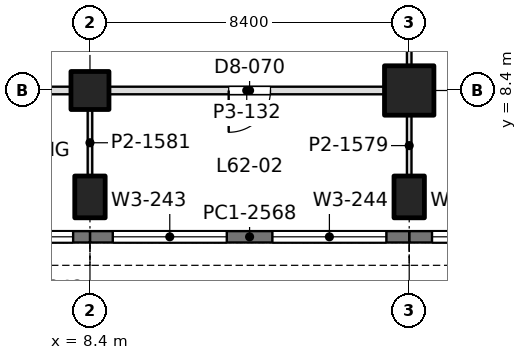
"""IFC4 building model, lengths in metres.
Left out: names, types, materials, properties, quantities, classifications, styles, units other than length and angle.
Written with IfcOpenShell. Run it as: python <this file> out.ifc"""

import sys

from ifc_helpers import new_model, si_unit, direction, frame, frame_2d, origin, origin_2d, place, context, subcontext, project, spatial, rectangle, extrude, element, fill, save


model = new_model("IFC4")
c1 = context("Model", 3, precision=1e-05, world=origin(), true_north=direction((0.0, 1.0)))
c2 = subcontext(c1, "Body", "Model", "MODEL_VIEW")
j1 = project(units=[si_unit("LENGTHUNIT", "METRE"), si_unit("PLANEANGLEUNIT", "RADIAN")], contexts=[c1])
p1 = place(None, origin())
s1 = spatial("IfcSite", under=j1, at=p1, CompositionType="ELEMENT")
p2 = place(p1, origin())
s2 = spatial("IfcBuilding", under=s1, at=p2, CompositionType="ELEMENT")
p3 = place(p2, frame((0.0, 0.0, 272.7)))
s3 = spatial("IfcBuildingStorey", under=s2, at=p3, CompositionType="ELEMENT", Elevation=272.7)
p4 = place(p3, frame((8.4, 5.6, 0.0), z_axis=(0.0, 0.0, 1.0), x_axis=(1.0, 0.0, 0.0)))
e1 = element("IfcColumn", 1, at=p4, inside=s3, PredefinedType="COLUMN", context=c2, shape_type="SweptSolid", body=[
    extrude(rectangle(XDim=0.8, YDim=1.1, at=origin_2d()), origin(), (0.0, 0.0, 1.0), 4.5),
])
p5 = place(p3, frame((8.4, 8.4, 0.0), z_axis=(0.0, 0.0, 1.0), x_axis=(1.0, 0.0, 0.0)))
e2 = element("IfcColumn", 2, at=p5, inside=s3, PredefinedType="COLUMN", context=c2, shape_type="SweptSolid", body=[
    extrude(rectangle(XDim=1.0, YDim=1.0, at=origin_2d()), origin(), (0.0, 0.0, 1.0), 4.5),
])
p6 = place(p3, frame((16.8, 5.6, 0.0), z_axis=(0.0, 0.0, 1.0), x_axis=(1.0, 0.0, 0.0)))
e3 = element("IfcColumn", 3, at=p6, inside=s3, PredefinedType="COLUMN", context=c2, shape_type="SweptSolid", body=[
    extrude(rectangle(XDim=0.8, YDim=1.1, at=origin_2d()), origin(), (0.0, 0.0, 1.0), 4.5),
])
p7 = place(p3, frame((16.8, 8.4, 0.0), z_axis=(0.0, 0.0, 1.0), x_axis=(1.0, 0.0, 0.0)))
e4 = element("IfcColumn", 4, at=p7, inside=s3, PredefinedType="COLUMN", context=c2, shape_type="SweptSolid", body=[
    extrude(rectangle(XDim=1.3, YDim=1.3, at=origin_2d()), origin(), (0.0, 0.0, 1.0), 4.5),
])
p8 = place(p3, frame((25.2, 4.55, 0.0), z_axis=(0.0, 0.0, 1.0), x_axis=(-1.0, 0.0, 0.0)))
e5 = element("IfcWall", 5, at=p8, inside=s3, PredefinedType="SOLIDWALL", context=c2, shape_type="SweptSolid", body=[
    extrude(rectangle(XDim=8.4, YDim=0.3, at=frame_2d((4.2, 0.0))), origin(), (0.0, 0.0, 1.0), 4.35),
])
p9 = place(p8, frame((0.6, 0.0, 0.9)))
e6 = element("IfcOpeningElement", 6, at=p9, cuts=e5, PredefinedType="OPENING", context=c2, shape_type="SweptSolid", body=[
    extrude(rectangle(XDim=3.0, YDim=2.4, at=frame_2d((1.5, 1.2))), frame((0.0, 0.16, 0.0), z_axis=(0.0, -1.0, 0.0), x_axis=(1.0, 0.0, 0.0)), (0.0, 0.0, 1.0), 0.32),
])
p10 = place(p8, frame((4.8, 0.0, 0.9)))
e7 = element("IfcOpeningElement", 7, at=p10, cuts=e5, PredefinedType="OPENING", context=c2, shape_type="SweptSolid", body=[
    extrude(rectangle(XDim=3.0, YDim=2.4, at=frame_2d((1.5, 1.2))), frame((0.0, 0.16, 0.0), z_axis=(0.0, -1.0, 0.0), x_axis=(1.0, 0.0, 0.0)), (0.0, 0.0, 1.0), 0.32),
])
p11 = place(p3, frame((16.8, 4.55, 0.0), z_axis=(0.0, 0.0, 1.0), x_axis=(-1.0, 0.0, 0.0)))
e8 = element("IfcWall", 8, at=p11, inside=s3, PredefinedType="SOLIDWALL", context=c2, shape_type="SweptSolid", body=[
    extrude(rectangle(XDim=8.4, YDim=0.3, at=frame_2d((4.2, 0.0))), origin(), (0.0, 0.0, 1.0), 4.35),
])
p12 = place(p11, frame((0.6, 0.0, 0.9)))
e9 = element("IfcOpeningElement", 9, at=p12, cuts=e8, PredefinedType="OPENING", context=c2, shape_type="SweptSolid", body=[
    extrude(rectangle(XDim=3.0, YDim=2.4, at=frame_2d((1.5, 1.2))), frame((0.0, 0.16, 0.0), z_axis=(0.0, -1.0, 0.0), x_axis=(1.0, 0.0, 0.0)), (0.0, 0.0, 1.0), 0.32),
])
p13 = place(p11, frame((4.8, 0.0, 0.9)))
e10 = element("IfcOpeningElement", 10, at=p13, cuts=e8, PredefinedType="OPENING", context=c2, shape_type="SweptSolid", body=[
    extrude(rectangle(XDim=3.0, YDim=2.4, at=frame_2d((1.5, 1.2))), frame((0.0, 0.16, 0.0), z_axis=(0.0, -1.0, 0.0), x_axis=(1.0, 0.0, 0.0)), (0.0, 0.0, 1.0), 0.32),
])
p14 = place(p3, frame((8.4, 4.55, 0.0), z_axis=(0.0, 0.0, 1.0), x_axis=(-1.0, 0.0, 0.0)))
e11 = element("IfcWall", 11, at=p14, inside=s3, PredefinedType="SOLIDWALL", context=c2, shape_type="SweptSolid", body=[
    extrude(rectangle(XDim=8.085, YDim=0.3, at=frame_2d((4.042, 0.0))), origin(), (0.0, 0.0, 1.0), 4.35),
])
p15 = place(p14, frame((0.443, 0.0, 0.9)))
e12 = element("IfcOpeningElement", 12, at=p15, cuts=e11, PredefinedType="OPENING", context=c2, shape_type="SweptSolid", body=[
    extrude(rectangle(XDim=3.0, YDim=2.4, at=frame_2d((1.5, 1.2))), frame((0.0, 0.16, 0.0), z_axis=(0.0, -1.0, 0.0), x_axis=(1.0, 0.0, 0.0)), (0.0, 0.0, 1.0), 0.32),
])
p16 = place(p14, frame((4.643, 0.0, 0.9)))
e13 = element("IfcOpeningElement", 13, at=p16, cuts=e11, PredefinedType="OPENING", context=c2, shape_type="SweptSolid", body=[
    extrude(rectangle(XDim=3.0, YDim=2.4, at=frame_2d((1.5, 1.2))), frame((0.0, 0.16, 0.0), z_axis=(0.0, -1.0, 0.0), x_axis=(1.0, 0.0, 0.0)), (0.0, 0.0, 1.0), 0.32),
])
p17 = place(p3, frame((0.549, 8.4, 0.0), z_axis=(0.0, 0.0, 1.0), x_axis=(1.0, 0.0, 0.0)))
e14 = element("IfcWall", 14, at=p17, inside=s3, PredefinedType="PARTITIONING", context=c2, shape_type="SweptSolid", body=[
    extrude(rectangle(XDim=7.352, YDim=0.2, at=frame_2d((3.676, 0.0))), origin(), (0.0, 0.0, 1.0), 3.8),
])
p18 = place(p17, frame((2.651, 0.0, 0.0)))
e15 = element("IfcOpeningElement", 15, at=p18, cuts=e14, PredefinedType="OPENING", context=c2, shape_type="SweptSolid", body=[
    extrude(rectangle(XDim=1.1, YDim=2.4, at=frame_2d((0.55, 1.2))), frame((0.0, 0.11, 0.0), z_axis=(0.0, -1.0, 0.0), x_axis=(1.0, 0.0, 0.0)), (0.0, 0.0, 1.0), 0.22),
])
p19 = place(p3, frame((8.899, 8.4, 0.0), z_axis=(0.0, 0.0, 1.0), x_axis=(1.0, 0.0, 0.0)))
e16 = element("IfcWall", 16, at=p19, inside=s3, PredefinedType="PARTITIONING", context=c2, shape_type="SweptSolid", body=[
    extrude(rectangle(XDim=7.252, YDim=0.2, at=frame_2d((3.626, 0.0))), origin(), (0.0, 0.0, 1.0), 3.8),
])
p20 = place(p19, frame((3.151, 0.0, 0.0)))
e17 = element("IfcOpeningElement", 17, at=p20, cuts=e16, PredefinedType="OPENING", context=c2, shape_type="SweptSolid", body=[
    extrude(rectangle(XDim=1.1, YDim=2.4, at=frame_2d((0.55, 1.2))), frame((0.0, 0.11, 0.0), z_axis=(0.0, -1.0, 0.0), x_axis=(1.0, 0.0, 0.0)), (0.0, 0.0, 1.0), 0.22),
])
p21 = place(p3, frame((8.4, 6.149, 0.0), z_axis=(0.0, 0.0, 1.0), x_axis=(0.0, 1.0, 0.0)))
e18 = element("IfcWall", 18, at=p21, inside=s3, PredefinedType="PARTITIONING", context=c2, shape_type="SweptSolid", body=[
    extrude(rectangle(XDim=1.752, YDim=0.12, at=frame_2d((0.876, 0.0))), origin(), (0.0, 0.0, 1.0), 3.99),
])
p22 = place(p3, frame((16.8, 6.149, 0.0), z_axis=(0.0, 0.0, 1.0), x_axis=(0.0, 1.0, 0.0)))
e19 = element("IfcWall", 19, at=p22, inside=s3, PredefinedType="PARTITIONING", context=c2, shape_type="SweptSolid", body=[
    extrude(rectangle(XDim=1.602, YDim=0.12, at=frame_2d((0.801, 0.0))), origin(), (0.0, 0.0, 1.0), 3.99),
])
p23 = place(p3, frame((16.8, 9.049, 0.0), z_axis=(0.0, 0.0, 1.0), x_axis=(0.0, 1.0, 0.0)))
e20 = element("IfcWall", 20, at=p23, inside=s3, PredefinedType="PARTITIONING", context=c2, shape_type="SweptSolid", body=[
    extrude(rectangle(XDim=1.253, YDim=0.12, at=frame_2d((0.626, 0.0))), origin(), (0.0, 0.0, 1.0), 3.99),
])
p24 = place(p10, origin())
e21 = element("IfcWindow", 21, at=p24, inside=s3, PartitioningType="SINGLE_PANEL", PredefinedType="WINDOW", context=c2, shape_type="SweptSolid", body=[
    extrude(rectangle(XDim=3.0, YDim=2.4, at=frame_2d((1.5, 1.2))), frame((0.0, 0.03, 0.0), z_axis=(0.0, -1.0, 0.0), x_axis=(1.0, 0.0, 0.0)), (0.0, 0.0, 1.0), 0.06),
])
fill(e7, e21)
p25 = place(p12, origin())
e22 = element("IfcWindow", 22, at=p25, inside=s3, PartitioningType="SINGLE_PANEL", PredefinedType="WINDOW", context=c2, shape_type="SweptSolid", body=[
    extrude(rectangle(XDim=3.0, YDim=2.4, at=frame_2d((1.5, 1.2))), frame((0.0, 0.03, 0.0), z_axis=(0.0, -1.0, 0.0), x_axis=(1.0, 0.0, 0.0)), (0.0, 0.0, 1.0), 0.06),
])
fill(e9, e22)
p26 = place(p13, origin())
e23 = element("IfcWindow", 23, at=p26, inside=s3, PartitioningType="SINGLE_PANEL", PredefinedType="WINDOW", context=c2, shape_type="SweptSolid", body=[
    extrude(rectangle(XDim=3.0, YDim=2.4, at=frame_2d((1.5, 1.2))), frame((0.0, 0.03, 0.0), z_axis=(0.0, -1.0, 0.0), x_axis=(1.0, 0.0, 0.0)), (0.0, 0.0, 1.0), 0.06),
])
fill(e10, e23)
p27 = place(p15, origin())
e24 = element("IfcWindow", 24, at=p27, inside=s3, PartitioningType="SINGLE_PANEL", PredefinedType="WINDOW", context=c2, shape_type="SweptSolid", body=[
    extrude(rectangle(XDim=3.0, YDim=2.4, at=frame_2d((1.5, 1.2))), frame((0.0, 0.03, 0.0), z_axis=(0.0, -1.0, 0.0), x_axis=(1.0, 0.0, 0.0)), (0.0, 0.0, 1.0), 0.06),
])
fill(e12, e24)
p28 = place(p20, frame((1.1, 0.0, 0.0), z_axis=(0.0, 0.0, 1.0), x_axis=(-1.0, 0.0, 0.0)))
e25 = element("IfcDoor", 25, at=p28, inside=s3, OperationType="SINGLE_SWING_RIGHT", PredefinedType="DOOR", context=c2, shape_type="SweptSolid", body=[
    extrude(rectangle(XDim=1.1, YDim=2.4, at=frame_2d((0.55, 1.2))), frame((0.0, 0.025, 0.0), z_axis=(0.0, -1.0, 0.0), x_axis=(1.0, 0.0, 0.0)), (0.0, 0.0, 1.0), 0.05),
])
fill(e17, e25)
save(model, sys.argv[1])
